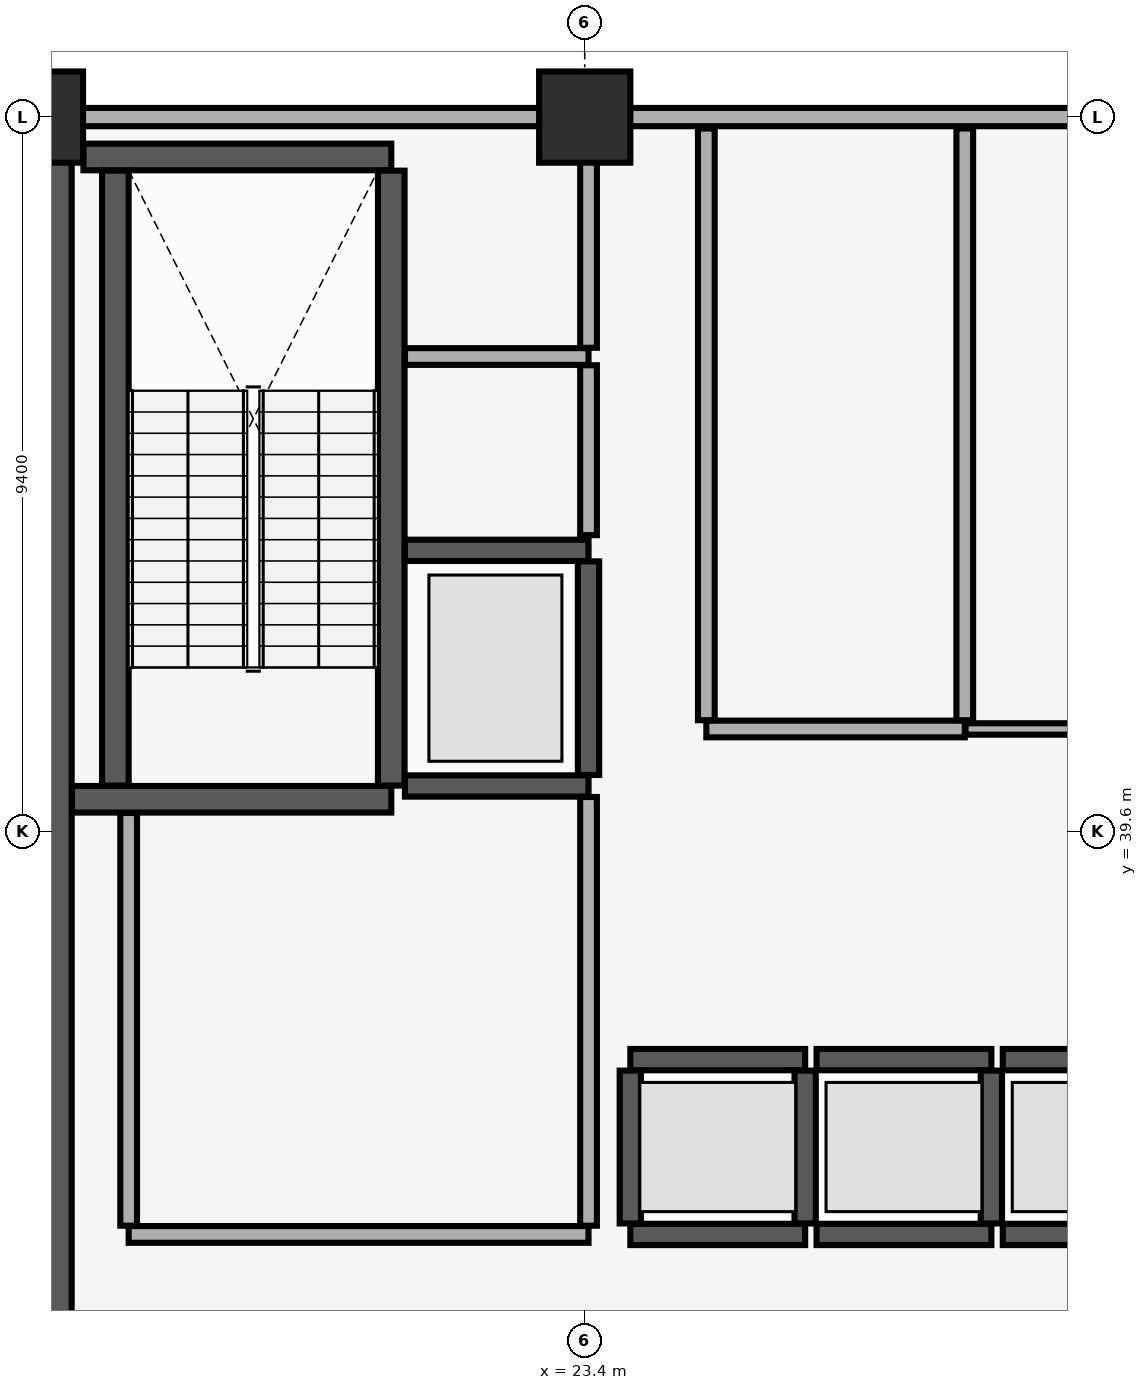
"""IFC4 building model, lengths in metres.
Left out: names, types, materials, properties, quantities, classifications, styles, units other than length and angle.
Written with IfcOpenShell. Run it as: python <this file> out.ifc"""

import sys

from ifc_helpers import new_model, si_unit, direction, frame, frame_2d, origin, origin_2d, place, context, subcontext, project, spatial, rectangle, extrude, element, fill, save


model = new_model("IFC4")
c1 = context("Model", 3, precision=1e-05, world=origin(), true_north=direction((0.0, 1.0)))
c2 = subcontext(c1, "Body", "Model", "MODEL_VIEW")
j1 = project(units=[si_unit("LENGTHUNIT", "METRE"), si_unit("PLANEANGLEUNIT", "RADIAN")], contexts=[c1])
p1 = place(None, origin())
s1 = spatial("IfcSite", under=j1, at=p1, CompositionType="ELEMENT")
p2 = place(p1, origin())
s2 = spatial("IfcBuilding", under=s1, at=p2, CompositionType="ELEMENT")
p3 = place(p2, frame((0.0, 0.0, 224.35)))
s3 = spatial("IfcBuildingStorey", under=s2, at=p3, CompositionType="ELEMENT", Elevation=224.35)
for number, where, z_axis, x_axis in (
    (1, (16.2, 49.0, 0.0), (0.0, 0.0, 1.0), (1.0, 0.0, 0.0)),
    (2, (23.4, 49.0, 0.0), (0.0, 0.0, 1.0), (1.0, 0.0, 0.0)),
):
    element("IfcColumn", number, at=place(p3, frame(where, z_axis=z_axis, x_axis=x_axis)), inside=s3, PredefinedType="COLUMN", context=c2, shape_type="SweptSolid", body=[
        extrude(rectangle(XDim=1.2, YDim=1.2, at=origin_2d()), origin(), (0.0, 0.0, 1.0), 4.56),
    ])
p4 = place(p3, frame((77.0, 49.0, 0.0), z_axis=(0.0, 0.0, 1.0), x_axis=(-1.0, 0.0, 0.0)))
e3 = element("IfcWall", 3, at=p4, inside=s3, PredefinedType="SOLIDWALL", context=c2, shape_type="SweptSolid", body=[
    extrude(rectangle(XDim=70.0, YDim=0.24, at=frame_2d((35.0, 0.0))), origin(), (0.0, 0.0, 1.0), 3.4),
])
p5 = place(p4, frame((62.975, 0.0, 0.85)))
e4 = element("IfcOpeningElement", 4, at=p5, cuts=e3, PredefinedType="OPENING", context=c2, shape_type="SweptSolid", body=[
    extrude(rectangle(XDim=3.0, YDim=1.5, at=frame_2d((1.5, 0.75))), frame((0.0, 0.13, 0.0), z_axis=(0.0, -1.0, 0.0), x_axis=(1.0, 0.0, 0.0)), (0.0, 0.0, 1.0), 0.26),
])
p6 = place(p4, frame((4.025, 0.0, 0.85)))
e5 = element("IfcOpeningElement", 5, at=p6, cuts=e3, PredefinedType="OPENING", context=c2, shape_type="SweptSolid", body=[
    extrude(rectangle(XDim=3.0, YDim=1.5, at=frame_2d((1.5, 0.75))), frame((0.0, 0.13, 0.0), z_axis=(0.0, -1.0, 0.0), x_axis=(1.0, 0.0, 0.0)), (0.0, 0.0, 1.0), 0.26),
])
p7 = place(p4, frame((49.465, 0.0, 0.9)))
e6 = element("IfcOpeningElement", 6, at=p7, cuts=e3, PredefinedType="OPENING", context=c2, shape_type="SweptSolid", body=[
    extrude(rectangle(XDim=1.5, YDim=1.4, at=frame_2d((0.75, 0.7))), frame((0.0, 0.13, 0.0), z_axis=(0.0, -1.0, 0.0), x_axis=(1.0, 0.0, 0.0)), (0.0, 0.0, 1.0), 0.26),
])
p8 = place(p4, frame((41.65, 0.0, 0.9)))
e7 = element("IfcOpeningElement", 7, at=p8, cuts=e3, PredefinedType="OPENING", context=c2, shape_type="SweptSolid", body=[
    extrude(rectangle(XDim=3.6, YDim=1.5, at=frame_2d((1.8, 0.75))), frame((0.0, 0.13, 0.0), z_axis=(0.0, -1.0, 0.0), x_axis=(1.0, 0.0, 0.0)), (0.0, 0.0, 1.0), 0.26),
])
p9 = place(p4, frame((28.25, 0.0, 0.9)))
e8 = element("IfcOpeningElement", 8, at=p9, cuts=e3, PredefinedType="OPENING", context=c2, shape_type="SweptSolid", body=[
    extrude(rectangle(XDim=1.5, YDim=1.4, at=frame_2d((0.75, 0.7))), frame((0.0, 0.13, 0.0), z_axis=(0.0, -1.0, 0.0), x_axis=(1.0, 0.0, 0.0)), (0.0, 0.0, 1.0), 0.26),
])
p10 = place(p4, frame((24.6, 0.0, 0.9)))
e9 = element("IfcOpeningElement", 9, at=p10, cuts=e3, PredefinedType="OPENING", context=c2, shape_type="SweptSolid", body=[
    extrude(rectangle(XDim=2.4, YDim=1.5, at=frame_2d((1.2, 0.75))), frame((0.0, 0.13, 0.0), z_axis=(0.0, -1.0, 0.0), x_axis=(1.0, 0.0, 0.0)), (0.0, 0.0, 1.0), 0.26),
])
p11 = place(p4, frame((20.235, 0.0, 0.9)))
e10 = element("IfcOpeningElement", 10, at=p11, cuts=e3, PredefinedType="OPENING", context=c2, shape_type="SweptSolid", body=[
    extrude(rectangle(XDim=2.4, YDim=1.5, at=frame_2d((1.2, 0.75))), frame((0.0, 0.13, 0.0), z_axis=(0.0, -1.0, 0.0), x_axis=(1.0, 0.0, 0.0)), (0.0, 0.0, 1.0), 0.26),
])
p12 = place(p3, frame((16.2, 29.4, 0.0), z_axis=(0.0, 0.0, 1.0), x_axis=(0.0, 1.0, 0.0)))
e11 = element("IfcWall", 11, at=p12, inside=s3, PredefinedType="SHEAR", context=c2, shape_type="SweptSolid", body=[
    extrude(rectangle(XDim=19.2, YDim=0.9, at=frame_2d((9.6, 0.0))), origin(), (0.0, 0.0, 1.0), 4.52),
])
p13 = place(p3, frame((16.655, 40.025, 0.0), z_axis=(0.0, 0.0, 1.0), x_axis=(1.0, 0.0, 0.0)))
e12 = element("IfcWall", 12, at=p13, inside=s3, PredefinedType="SHEAR", context=c2, shape_type="SweptSolid", body=[
    extrude(rectangle(XDim=4.2, YDim=0.35, at=frame_2d((2.1, 0.0))), origin(), (0.0, 0.0, 1.0), 4.52),
])
p14 = place(p13, frame((1.81, 0.0, 0.0)))
e13 = element("IfcOpeningElement", 13, at=p14, cuts=e12, PredefinedType="OPENING", context=c2, shape_type="SweptSolid", body=[
    extrude(rectangle(XDim=1.15, YDim=2.15, at=frame_2d((0.575, 1.075))), frame((0.0, 0.185, 0.0), z_axis=(0.0, -1.0, 0.0), x_axis=(1.0, 0.0, 0.0)), (0.0, 0.0, 1.0), 0.37),
])
p15 = place(p3, frame((16.805, 48.475, 0.0), z_axis=(0.0, 0.0, 1.0), x_axis=(1.0, 0.0, 0.0)))
e14 = element("IfcWall", 14, at=p15, inside=s3, PredefinedType="SHEAR", context=c2, shape_type="SweptSolid", body=[
    extrude(rectangle(XDim=4.05, YDim=0.35, at=frame_2d((2.025, 0.0))), origin(), (0.0, 0.0, 1.0), 4.52),
])
for number, where, z_axis, x_axis in (
    (15, (17.225, 40.205, 0.0), (0.0, 0.0, 1.0), (0.0, 1.0, 0.0)),
    (16, (20.855, 40.205, 0.0), (0.0, 0.0, 1.0), (0.0, 1.0, 0.0)),
):
    element("IfcWall", number, at=place(p3, frame(where, z_axis=z_axis, x_axis=x_axis)), inside=s3, PredefinedType="SHEAR", context=c2, shape_type="SweptSolid", body=[
        extrude(rectangle(XDim=8.09, YDim=0.35, at=frame_2d((4.045, 0.0))), origin(), (0.0, 0.0, 1.0), 4.52),
    ])
p16 = place(p3, frame((24.0, 34.3, 0.0), z_axis=(0.0, 0.0, 1.0), x_axis=(1.0, 0.0, 0.0)))
e17 = element("IfcWall", 17, at=p16, inside=s3, PredefinedType="SHEAR", context=c2, shape_type="SweptSolid", body=[
    extrude(rectangle(XDim=2.3, YDim=0.28, at=frame_2d((1.15, 0.0))), origin(), (0.0, 0.0, 1.0), 4.52),
])
p17 = place(p16, frame((0.6, 0.0, 0.0)))
e18 = element("IfcOpeningElement", 18, at=p17, cuts=e17, PredefinedType="OPENING", context=c2, shape_type="SweptSolid", body=[
    extrude(rectangle(XDim=1.1, YDim=2.2, at=frame_2d((0.55, 1.1))), frame((0.0, 0.15, 0.0), z_axis=(0.0, -1.0, 0.0), x_axis=(1.0, 0.0, 0.0)), (0.0, 0.0, 1.0), 0.3),
])
p18 = place(p3, frame((24.0, 36.6, 0.0), z_axis=(0.0, 0.0, 1.0), x_axis=(1.0, 0.0, 0.0)))
e19 = element("IfcWall", 19, at=p18, inside=s3, PredefinedType="SHEAR", context=c2, shape_type="SweptSolid", body=[
    extrude(rectangle(XDim=2.3, YDim=0.28, at=frame_2d((1.15, 0.0))), origin(), (0.0, 0.0, 1.0), 4.52),
])
for number, where, z_axis, x_axis in (
    (20, (24.0, 34.445, 0.0), (0.0, 0.0, 1.0), (0.0, 1.0, 0.0)),
    (21, (26.3, 34.445, 0.0), (0.0, 0.0, 1.0), (0.0, 1.0, 0.0)),
):
    element("IfcWall", number, at=place(p3, frame(where, z_axis=z_axis, x_axis=x_axis)), inside=s3, PredefinedType="SHEAR", context=c2, shape_type="SweptSolid", body=[
        extrude(rectangle(XDim=2.01, YDim=0.28, at=frame_2d((1.005, 0.0))), origin(), (0.0, 0.0, 1.0), 4.52),
    ])
p19 = place(p3, frame((26.45, 34.3, 0.0), z_axis=(0.0, 0.0, 1.0), x_axis=(1.0, 0.0, 0.0)))
e22 = element("IfcWall", 22, at=p19, inside=s3, PredefinedType="SHEAR", context=c2, shape_type="SweptSolid", body=[
    extrude(rectangle(XDim=2.3, YDim=0.28, at=frame_2d((1.15, 0.0))), origin(), (0.0, 0.0, 1.0), 4.52),
])
p20 = place(p19, frame((0.6, 0.0, 0.0)))
e23 = element("IfcOpeningElement", 23, at=p20, cuts=e22, PredefinedType="OPENING", context=c2, shape_type="SweptSolid", body=[
    extrude(rectangle(XDim=1.1, YDim=2.2, at=frame_2d((0.55, 1.1))), frame((0.0, 0.15, 0.0), z_axis=(0.0, -1.0, 0.0), x_axis=(1.0, 0.0, 0.0)), (0.0, 0.0, 1.0), 0.3),
])
p21 = place(p3, frame((26.45, 36.6, 0.0), z_axis=(0.0, 0.0, 1.0), x_axis=(1.0, 0.0, 0.0)))
e24 = element("IfcWall", 24, at=p21, inside=s3, PredefinedType="SHEAR", context=c2, shape_type="SweptSolid", body=[
    extrude(rectangle(XDim=2.3, YDim=0.28, at=frame_2d((1.15, 0.0))), origin(), (0.0, 0.0, 1.0), 4.52),
])
p22 = place(p3, frame((28.75, 34.445, 0.0), z_axis=(0.0, 0.0, 1.0), x_axis=(0.0, 1.0, 0.0)))
e25 = element("IfcWall", 25, at=p22, inside=s3, PredefinedType="SHEAR", context=c2, shape_type="SweptSolid", body=[
    extrude(rectangle(XDim=2.01, YDim=0.28, at=frame_2d((1.005, 0.0))), origin(), (0.0, 0.0, 1.0), 4.52),
])
p23 = place(p3, frame((28.9, 34.3, 0.0), z_axis=(0.0, 0.0, 1.0), x_axis=(1.0, 0.0, 0.0)))
e26 = element("IfcWall", 26, at=p23, inside=s3, PredefinedType="SHEAR", context=c2, shape_type="SweptSolid", body=[
    extrude(rectangle(XDim=2.3, YDim=0.28, at=frame_2d((1.15, 0.0))), origin(), (0.0, 0.0, 1.0), 4.52),
])
p24 = place(p23, frame((0.6, 0.0, 0.0)))
e27 = element("IfcOpeningElement", 27, at=p24, cuts=e26, PredefinedType="OPENING", context=c2, shape_type="SweptSolid", body=[
    extrude(rectangle(XDim=1.1, YDim=2.2, at=frame_2d((0.55, 1.1))), frame((0.0, 0.15, 0.0), z_axis=(0.0, -1.0, 0.0), x_axis=(1.0, 0.0, 0.0)), (0.0, 0.0, 1.0), 0.3),
])
p25 = place(p3, frame((28.9, 36.6, 0.0), z_axis=(0.0, 0.0, 1.0), x_axis=(1.0, 0.0, 0.0)))
e28 = element("IfcWall", 28, at=p25, inside=s3, PredefinedType="SHEAR", context=c2, shape_type="SweptSolid", body=[
    extrude(rectangle(XDim=2.3, YDim=0.28, at=frame_2d((1.15, 0.0))), origin(), (0.0, 0.0, 1.0), 4.52),
])
p26 = place(p3, frame((21.035, 40.2, 0.0), z_axis=(0.0, 0.0, 1.0), x_axis=(1.0, 0.0, 0.0)))
e29 = element("IfcWall", 29, at=p26, inside=s3, PredefinedType="SHEAR", context=c2, shape_type="SweptSolid", body=[
    extrude(rectangle(XDim=2.415, YDim=0.28, at=frame_2d((1.208, 0.0))), origin(), (0.0, 0.0, 1.0), 4.52),
])
p27 = place(p26, frame((0.54, 0.0, 0.0)))
e30 = element("IfcOpeningElement", 30, at=p27, cuts=e29, PredefinedType="OPENING", context=c2, shape_type="SweptSolid", body=[
    extrude(rectangle(XDim=1.3, YDim=2.3, at=frame_2d((0.65, 1.15))), frame((0.0, 0.15, 0.0), z_axis=(0.0, -1.0, 0.0), x_axis=(1.0, 0.0, 0.0)), (0.0, 0.0, 1.0), 0.3),
])
p28 = place(p3, frame((21.035, 43.3, 0.0), z_axis=(0.0, 0.0, 1.0), x_axis=(1.0, 0.0, 0.0)))
e31 = element("IfcWall", 31, at=p28, inside=s3, PredefinedType="SHEAR", context=c2, shape_type="SweptSolid", body=[
    extrude(rectangle(XDim=2.415, YDim=0.28, at=frame_2d((1.208, 0.0))), origin(), (0.0, 0.0, 1.0), 4.52),
])
p29 = place(p3, frame((23.45, 40.345, 0.0), z_axis=(0.0, 0.0, 1.0), x_axis=(0.0, 1.0, 0.0)))
e32 = element("IfcWall", 32, at=p29, inside=s3, PredefinedType="SHEAR", context=c2, shape_type="SweptSolid", body=[
    extrude(rectangle(XDim=2.81, YDim=0.28, at=frame_2d((1.405, 0.0))), origin(), (0.0, 0.0, 1.0), 4.52),
])
p30 = place(p3, frame((17.4, 34.3, 0.0), z_axis=(0.0, 0.0, 1.0), x_axis=(1.0, 0.0, 0.0)))
e33 = element("IfcWall", 33, at=p30, inside=s3, PredefinedType="PARTITIONING", context=c2, shape_type="SweptSolid", body=[
    extrude(rectangle(XDim=6.05, YDim=0.22, at=frame_2d((3.025, 0.0))), origin(), (0.0, 0.0, 1.0), 4.52),
])
p31 = place(p30, frame((2.2, 0.0, 0.0)))
e34 = element("IfcOpeningElement", 34, at=p31, cuts=e33, PredefinedType="OPENING", context=c2, shape_type="SweptSolid", body=[
    extrude(rectangle(XDim=1.2, YDim=2.15, at=frame_2d((0.6, 1.075))), frame((0.0, 0.12, 0.0), z_axis=(0.0, -1.0, 0.0), x_axis=(1.0, 0.0, 0.0)), (0.0, 0.0, 1.0), 0.24),
])
p32 = place(p3, frame((17.4, 34.415, 0.0), z_axis=(0.0, 0.0, 1.0), x_axis=(0.0, 1.0, 0.0)))
e35 = element("IfcWall", 35, at=p32, inside=s3, PredefinedType="PARTITIONING", context=c2, shape_type="SweptSolid", body=[
    extrude(rectangle(XDim=5.43, YDim=0.22, at=frame_2d((2.715, 0.0))), origin(), (0.0, 0.0, 1.0), 4.52),
])
p33 = place(p3, frame((23.45, 34.415, 0.0), z_axis=(0.0, 0.0, 1.0), x_axis=(0.0, 1.0, 0.0)))
e36 = element("IfcWall", 36, at=p33, inside=s3, PredefinedType="PARTITIONING", context=c2, shape_type="SweptSolid", body=[
    extrude(rectangle(XDim=5.64, YDim=0.22, at=frame_2d((2.82, 0.0))), origin(), (0.0, 0.0, 1.0), 4.52),
])
p34 = place(p3, frame((21.035, 45.85, 0.0), z_axis=(0.0, 0.0, 1.0), x_axis=(1.0, 0.0, 0.0)))
e37 = element("IfcWall", 37, at=p34, inside=s3, PredefinedType="PARTITIONING", context=c2, shape_type="SweptSolid", body=[
    extrude(rectangle(XDim=2.415, YDim=0.22, at=frame_2d((1.208, 0.0))), origin(), (0.0, 0.0, 1.0), 4.52),
])
p35 = place(p3, frame((23.45, 43.5, 0.0), z_axis=(0.0, 0.0, 1.0), x_axis=(0.0, 1.0, 0.0)))
e38 = element("IfcWall", 38, at=p35, inside=s3, PredefinedType="PARTITIONING", context=c2, shape_type="SweptSolid", body=[
    extrude(rectangle(XDim=2.235, YDim=0.22, at=frame_2d((1.118, 0.0))), origin(), (0.0, 0.0, 1.0), 4.52),
])
p36 = place(p35, frame((0.725, 0.0, 0.0)))
e39 = element("IfcOpeningElement", 39, at=p36, cuts=e38, PredefinedType="OPENING", context=c2, shape_type="SweptSolid", body=[
    extrude(rectangle(XDim=0.85, YDim=2.1, at=frame_2d((0.425, 1.05))), frame((0.0, 0.12, 0.0), z_axis=(0.0, -1.0, 0.0), x_axis=(1.0, 0.0, 0.0)), (0.0, 0.0, 1.0), 0.24),
])
p37 = place(p3, frame((23.45, 45.965, 0.0), z_axis=(0.0, 0.0, 1.0), x_axis=(0.0, 1.0, 0.0)))
e40 = element("IfcWall", 40, at=p37, inside=s3, PredefinedType="PARTITIONING", context=c2, shape_type="SweptSolid", body=[
    extrude(rectangle(XDim=2.885, YDim=0.22, at=frame_2d((1.442, 0.0))), origin(), (0.0, 0.0, 1.0), 4.52),
])
p38 = place(p37, frame((0.96, 0.0, 0.0)))
e41 = element("IfcOpeningElement", 41, at=p38, cuts=e40, PredefinedType="OPENING", context=c2, shape_type="SweptSolid", body=[
    extrude(rectangle(XDim=0.85, YDim=2.1, at=frame_2d((0.425, 1.05))), frame((0.0, 0.12, 0.0), z_axis=(0.0, -1.0, 0.0), x_axis=(1.0, 0.0, 0.0)), (0.0, 0.0, 1.0), 0.24),
])
p39 = place(p3, frame((25.0, 40.95, 0.0), z_axis=(0.0, 0.0, 1.0), x_axis=(1.0, 0.0, 0.0)))
e42 = element("IfcWall", 42, at=p39, inside=s3, PredefinedType="PARTITIONING", context=c2, shape_type="SweptSolid", body=[
    extrude(rectangle(XDim=3.4, YDim=0.22, at=frame_2d((1.7, 0.0))), origin(), (0.0, 0.0, 1.0), 4.52),
])
p40 = place(p39, frame((1.275, 0.0, 0.0)))
e43 = element("IfcOpeningElement", 43, at=p40, cuts=e42, PredefinedType="OPENING", context=c2, shape_type="SweptSolid", body=[
    extrude(rectangle(XDim=0.85, YDim=2.1, at=frame_2d((0.425, 1.05))), frame((0.0, 0.12, 0.0), z_axis=(0.0, -1.0, 0.0), x_axis=(1.0, 0.0, 0.0)), (0.0, 0.0, 1.0), 0.24),
])
for number, where, z_axis, x_axis in (
    (44, (25.0, 41.065, 0.0), (0.0, 0.0, 1.0), (0.0, 1.0, 0.0)),
    (45, (28.4, 41.065, 0.0), (0.0, 0.0, 1.0), (0.0, 1.0, 0.0)),
):
    element("IfcWall", number, at=place(p3, frame(where, z_axis=z_axis, x_axis=x_axis)), inside=s3, PredefinedType="PARTITIONING", context=c2, shape_type="SweptSolid", body=[
        extrude(rectangle(XDim=7.785, YDim=0.22, at=frame_2d((3.893, 0.0))), origin(), (0.0, 0.0, 1.0), 4.52),
    ])
p41 = place(p3, frame((28.41, 40.95, 0.0), z_axis=(0.0, 0.0, 1.0), x_axis=(1.0, 0.0, 0.0)))
e46 = element("IfcWall", 46, at=p41, inside=s3, PredefinedType="PARTITIONING", context=c2, shape_type="SweptSolid", body=[
    extrude(rectangle(XDim=7.69, YDim=0.15, at=frame_2d((3.845, 0.0))), origin(), (0.0, 0.0, 1.0), 4.52),
])
p42 = place(p41, frame((3.415, 0.0, 0.0)))
e47 = element("IfcOpeningElement", 47, at=p42, cuts=e46, PredefinedType="OPENING", context=c2, shape_type="SweptSolid", body=[
    extrude(rectangle(XDim=0.85, YDim=2.1, at=frame_2d((0.425, 1.05))), frame((0.0, 0.085, 0.0), z_axis=(0.0, -1.0, 0.0), x_axis=(1.0, 0.0, 0.0)), (0.0, 0.0, 1.0), 0.17),
])
p43 = place(p7, origin())
e48 = element("IfcWindow", 48, at=p43, inside=s3, PartitioningType="SINGLE_PANEL", PredefinedType="WINDOW", context=c2, shape_type="SweptSolid", body=[
    extrude(rectangle(XDim=1.5, YDim=1.4, at=frame_2d((0.75, 0.7))), frame((0.0, 0.03, 0.0), z_axis=(0.0, -1.0, 0.0), x_axis=(1.0, 0.0, 0.0)), (0.0, 0.0, 1.0), 0.06),
])
fill(e6, e48)
p44 = place(p14, origin())
e49 = element("IfcDoor", 49, at=p44, inside=s3, OperationType="SINGLE_SWING_RIGHT", PredefinedType="DOOR", context=c2, shape_type="SweptSolid", body=[
    extrude(rectangle(XDim=1.15, YDim=2.15, at=frame_2d((0.575, 1.075))), frame((0.0, 0.025, 0.0), z_axis=(0.0, -1.0, 0.0), x_axis=(1.0, 0.0, 0.0)), (0.0, 0.0, 1.0), 0.05),
])
fill(e13, e49)
p45 = place(p17, origin())
e50 = element("IfcDoor", 50, at=p45, inside=s3, OperationType="DOUBLE_DOOR_SLIDING", PredefinedType="DOOR", context=c2, shape_type="SweptSolid", body=[
    extrude(rectangle(XDim=1.1, YDim=2.2, at=frame_2d((0.55, 1.1))), frame((0.0, 0.025, 0.0), z_axis=(0.0, -1.0, 0.0), x_axis=(1.0, 0.0, 0.0)), (0.0, 0.0, 1.0), 0.05),
])
fill(e18, e50)
p46 = place(p20, origin())
e51 = element("IfcDoor", 51, at=p46, inside=s3, OperationType="DOUBLE_DOOR_SLIDING", PredefinedType="DOOR", context=c2, shape_type="SweptSolid", body=[
    extrude(rectangle(XDim=1.1, YDim=2.2, at=frame_2d((0.55, 1.1))), frame((0.0, 0.025, 0.0), z_axis=(0.0, -1.0, 0.0), x_axis=(1.0, 0.0, 0.0)), (0.0, 0.0, 1.0), 0.05),
])
fill(e23, e51)
p47 = place(p24, origin())
e52 = element("IfcDoor", 52, at=p47, inside=s3, OperationType="DOUBLE_DOOR_SLIDING", PredefinedType="DOOR", context=c2, shape_type="SweptSolid", body=[
    extrude(rectangle(XDim=1.1, YDim=2.2, at=frame_2d((0.55, 1.1))), frame((0.0, 0.025, 0.0), z_axis=(0.0, -1.0, 0.0), x_axis=(1.0, 0.0, 0.0)), (0.0, 0.0, 1.0), 0.05),
])
fill(e27, e52)
p48 = place(p27, origin())
e53 = element("IfcDoor", 53, at=p48, inside=s3, OperationType="DOUBLE_DOOR_SLIDING", PredefinedType="DOOR", context=c2, shape_type="SweptSolid", body=[
    extrude(rectangle(XDim=1.3, YDim=2.3, at=frame_2d((0.65, 1.15))), frame((0.0, 0.025, 0.0), z_axis=(0.0, -1.0, 0.0), x_axis=(1.0, 0.0, 0.0)), (0.0, 0.0, 1.0), 0.05),
])
fill(e30, e53)
p49 = place(p31, origin())
e54 = element("IfcDoor", 54, at=p49, inside=s3, OperationType="SINGLE_SWING_LEFT", PredefinedType="DOOR", context=c2, shape_type="SweptSolid", body=[
    extrude(rectangle(XDim=1.2, YDim=2.15, at=frame_2d((0.6, 1.075))), frame((0.0, 0.025, 0.0), z_axis=(0.0, -1.0, 0.0), x_axis=(1.0, 0.0, 0.0)), (0.0, 0.0, 1.0), 0.05),
])
fill(e34, e54)
p50 = place(p36, origin())
e55 = element("IfcDoor", 55, at=p50, inside=s3, OperationType="SINGLE_SWING_LEFT", PredefinedType="DOOR", context=c2, shape_type="SweptSolid", body=[
    extrude(rectangle(XDim=0.85, YDim=2.1, at=frame_2d((0.425, 1.05))), frame((0.0, 0.025, 0.0), z_axis=(0.0, -1.0, 0.0), x_axis=(1.0, 0.0, 0.0)), (0.0, 0.0, 1.0), 0.05),
])
fill(e39, e55)
p51 = place(p38, origin())
e56 = element("IfcDoor", 56, at=p51, inside=s3, OperationType="SINGLE_SWING_RIGHT", PredefinedType="DOOR", context=c2, shape_type="SweptSolid", body=[
    extrude(rectangle(XDim=0.85, YDim=2.1, at=frame_2d((0.425, 1.05))), frame((0.0, 0.025, 0.0), z_axis=(0.0, -1.0, 0.0), x_axis=(1.0, 0.0, 0.0)), (0.0, 0.0, 1.0), 0.05),
])
fill(e41, e56)
p52 = place(p40, origin())
e57 = element("IfcDoor", 57, at=p52, inside=s3, OperationType="SINGLE_SWING_RIGHT", PredefinedType="DOOR", context=c2, shape_type="SweptSolid", body=[
    extrude(rectangle(XDim=0.85, YDim=2.1, at=frame_2d((0.425, 1.05))), frame((0.0, 0.025, 0.0), z_axis=(0.0, -1.0, 0.0), x_axis=(1.0, 0.0, 0.0)), (0.0, 0.0, 1.0), 0.05),
])
fill(e43, e57)
save(model, sys.argv[1])
